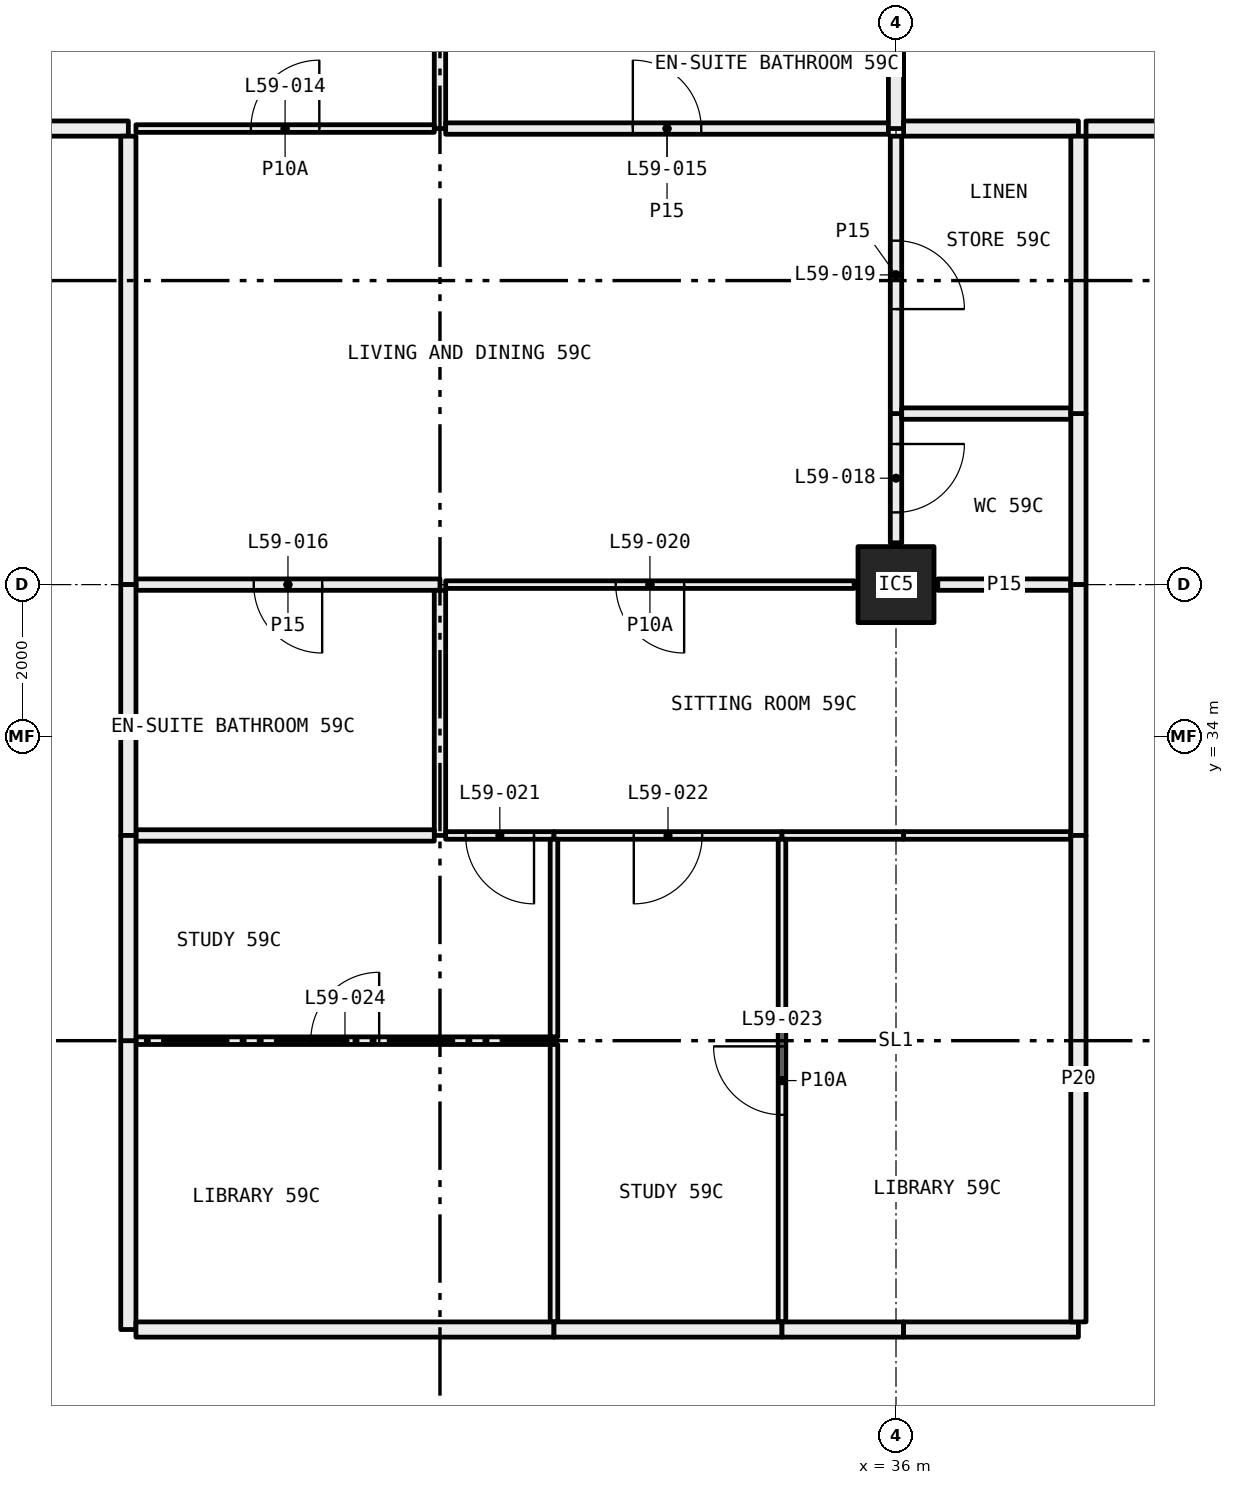
"""IFC4 building model, lengths in metres.
Left out: names, types, materials, properties, quantities, classifications, styles, units other than length and angle.
Written with IfcOpenShell. Run it as: python <this file> out.ifc"""

import sys

from ifc_helpers import new_model, si_unit, direction, frame, frame_2d, origin, origin_2d, place, context, subcontext, project, spatial, rectangle, hollow_rectangle, extrude, element, fill, save


model = new_model("IFC4")
c1 = context("Model", 3, precision=1e-05, world=origin(), true_north=direction((0.0, 1.0)))
c2 = subcontext(c1, "Body", "Model", "MODEL_VIEW")
j1 = project(units=[si_unit("LENGTHUNIT", "METRE"), si_unit("PLANEANGLEUNIT", "RADIAN")], contexts=[c1])
p1 = place(None, origin())
s1 = spatial("IfcSite", under=j1, at=p1, CompositionType="ELEMENT")
p2 = place(p1, origin())
s2 = spatial("IfcBuilding", under=s1, at=p2, CompositionType="ELEMENT")
p3 = place(p2, frame((0.0, 0.0, 221.4)))
s3 = spatial("IfcBuildingStorey", under=s2, at=p3, CompositionType="ELEMENT", Elevation=221.4)
p4 = place(p3, frame((36.0, 36.0, 0.0), z_axis=(0.0, 0.0, 1.0), x_axis=(1.0, 0.0, 0.0)))
e1 = element("IfcColumn", 1, at=p4, inside=s3, PredefinedType="COLUMN", context=c2, shape_type="SweptSolid", body=[
    extrude(hollow_rectangle(XDim=1.0, YDim=1.0, WallThickness=0.04, at=origin_2d()), origin(), (0.0, 0.0, 1.0), 3.05),
])
p5 = place(p3, frame((30.0, 42.0, 0.0), z_axis=(0.0, 0.0, 1.0), x_axis=(0.0, 1.0, 0.0)))
e2 = element("IfcWall", 2, at=p5, inside=s3, PredefinedType="PARTITIONING", context=c2, shape_type="SweptSolid", body=[
    extrude(rectangle(XDim=1.68, YDim=0.15, at=frame_2d((0.84, 0.0))), origin(), (0.0, 0.0, 1.0), 3.05),
])
p6 = place(p3, frame((26.0, 42.0, 0.0), z_axis=(0.0, 0.0, 1.0), x_axis=(1.0, 0.0, 0.0)))
e3 = element("IfcWall", 3, at=p6, inside=s3, PredefinedType="PARTITIONING", context=c2, shape_type="SweptSolid", body=[
    extrude(rectangle(XDim=3.925, YDim=0.1, at=frame_2d((1.962, 0.0))), origin(), (0.0, 0.0, 1.0), 3.05),
])
p7 = place(p6, frame((1.512, 0.0, 0.0)))
e4 = element("IfcOpeningElement", 4, at=p7, cuts=e3, PredefinedType="OPENING", context=c2, shape_type="SweptSolid", body=[
    extrude(rectangle(XDim=0.9, YDim=2.1, at=frame_2d((0.45, 1.05))), frame((0.0, 0.06, 0.0), z_axis=(0.0, -1.0, 0.0), x_axis=(1.0, 0.0, 0.0)), (0.0, 0.0, 1.0), 0.12),
])
p8 = place(p3, frame((24.0, 42.0, 0.0), z_axis=(0.0, 0.0, 1.0), x_axis=(1.0, 0.0, 0.0)))
e5 = element("IfcWall", 5, at=p8, inside=s3, PredefinedType="PARTITIONING", context=c2, shape_type="SweptSolid", body=[
    extrude(rectangle(XDim=1.9, YDim=0.2, at=frame_2d((0.95, 0.0))), origin(), (0.0, 0.0, 1.0), 3.05),
])
p9 = place(p3, frame((30.075, 42.0, 0.0), z_axis=(0.0, 0.0, 1.0), x_axis=(1.0, 0.0, 0.0)))
e6 = element("IfcWall", 6, at=p9, inside=s3, PredefinedType="PARTITIONING", context=c2, shape_type="SweptSolid", body=[
    extrude(rectangle(XDim=5.825, YDim=0.15, at=frame_2d((2.913, 0.0))), origin(), (0.0, 0.0, 1.0), 3.05),
])
p10 = place(p9, frame((2.462, 0.0, 0.0)))
e7 = element("IfcOpeningElement", 7, at=p10, cuts=e6, PredefinedType="OPENING", context=c2, shape_type="SweptSolid", body=[
    extrude(rectangle(XDim=0.9, YDim=2.1, at=frame_2d((0.45, 1.05))), frame((0.0, 0.085, 0.0), z_axis=(0.0, -1.0, 0.0), x_axis=(1.0, 0.0, 0.0)), (0.0, 0.0, 1.0), 0.17),
])
p11 = place(p3, frame((36.0, 42.0, 0.0), z_axis=(0.0, 0.0, 1.0), x_axis=(0.0, 1.0, 0.0)))
e8 = element("IfcWall", 8, at=p11, inside=s3, PredefinedType="PARTITIONING", context=c2, shape_type="SweptSolid", body=[
    extrude(rectangle(XDim=1.68, YDim=0.2, at=frame_2d((0.84, 0.0))), origin(), (0.0, 0.0, 1.0), 2.45),
])
p12 = place(p3, frame((36.0, 36.55, 0.0), z_axis=(0.0, 0.0, 1.0), x_axis=(0.0, 1.0, 0.0)))
e9 = element("IfcWall", 9, at=p12, inside=s3, PredefinedType="PARTITIONING", context=c2, shape_type="SweptSolid", body=[
    extrude(rectangle(XDim=1.7, YDim=0.15, at=frame_2d((0.85, 0.0))), origin(), (0.0, 0.0, 1.0), 2.45),
])
p13 = place(p12, frame((0.4, 0.0, 0.0)))
e10 = element("IfcOpeningElement", 10, at=p13, cuts=e9, PredefinedType="OPENING", context=c2, shape_type="SweptSolid", body=[
    extrude(rectangle(XDim=0.9, YDim=2.1, at=frame_2d((0.45, 1.05))), frame((0.0, 0.085, 0.0), z_axis=(0.0, -1.0, 0.0), x_axis=(1.0, 0.0, 0.0)), (0.0, 0.0, 1.0), 0.17),
])
p14 = place(p3, frame((36.0, 38.25, 0.0), z_axis=(0.0, 0.0, 1.0), x_axis=(0.0, 1.0, 0.0)))
e11 = element("IfcWall", 11, at=p14, inside=s3, PredefinedType="PARTITIONING", context=c2, shape_type="SweptSolid", body=[
    extrude(rectangle(XDim=3.65, YDim=0.15, at=frame_2d((1.825, 0.0))), origin(), (0.0, 0.0, 1.0), 2.45),
])
p15 = place(p14, frame((1.375, 0.0, 0.0)))
e12 = element("IfcOpeningElement", 12, at=p15, cuts=e11, PredefinedType="OPENING", context=c2, shape_type="SweptSolid", body=[
    extrude(rectangle(XDim=0.9, YDim=2.1, at=frame_2d((0.45, 1.05))), frame((0.0, 0.085, 0.0), z_axis=(0.0, -1.0, 0.0), x_axis=(1.0, 0.0, 0.0)), (0.0, 0.0, 1.0), 0.17),
])
p16 = place(p3, frame((26.0, 36.0, 0.0), z_axis=(0.0, 0.0, 1.0), x_axis=(1.0, 0.0, 0.0)))
e13 = element("IfcWall", 13, at=p16, inside=s3, PredefinedType="PARTITIONING", context=c2, shape_type="SweptSolid", body=[
    extrude(rectangle(XDim=4.0, YDim=0.15, at=frame_2d((2.0, 0.0))), origin(), (0.0, 0.0, 1.0), 2.45),
])
p17 = place(p16, frame((1.55, 0.0, 0.0)))
e14 = element("IfcOpeningElement", 14, at=p17, cuts=e13, PredefinedType="OPENING", context=c2, shape_type="SweptSolid", body=[
    extrude(rectangle(XDim=0.9, YDim=2.1, at=frame_2d((0.45, 1.05))), frame((0.0, 0.085, 0.0), z_axis=(0.0, -1.0, 0.0), x_axis=(1.0, 0.0, 0.0)), (0.0, 0.0, 1.0), 0.17),
])
p18 = place(p3, frame((30.075, 36.0, 0.0), z_axis=(0.0, 0.0, 1.0), x_axis=(1.0, 0.0, 0.0)))
e15 = element("IfcWall", 15, at=p18, inside=s3, PredefinedType="PARTITIONING", context=c2, shape_type="SweptSolid", body=[
    extrude(rectangle(XDim=5.375, YDim=0.1, at=frame_2d((2.688, 0.0))), origin(), (0.0, 0.0, 1.0), 2.45),
])
p19 = place(p18, frame((2.238, 0.0, 0.0)))
e16 = element("IfcOpeningElement", 16, at=p19, cuts=e15, PredefinedType="OPENING", context=c2, shape_type="SweptSolid", body=[
    extrude(rectangle(XDim=0.9, YDim=2.1, at=frame_2d((0.45, 1.05))), frame((0.0, 0.06, 0.0), z_axis=(0.0, -1.0, 0.0), x_axis=(1.0, 0.0, 0.0)), (0.0, 0.0, 1.0), 0.12),
])
p20 = place(p3, frame((25.9, 41.9, 0.0), z_axis=(0.0, 0.0, 1.0), x_axis=(0.0, -1.0, 0.0)))
e17 = element("IfcWall", 17, at=p20, inside=s3, PredefinedType="PARTITIONING", context=c2, shape_type="SweptSolid", body=[
    extrude(rectangle(XDim=5.9, YDim=0.2, at=frame_2d((2.95, 0.0))), origin(), (0.0, 0.0, 1.0), 2.45),
])
p21 = place(p3, frame((38.3, 38.25, 0.0), z_axis=(0.0, 0.0, 1.0), x_axis=(-1.0, 0.0, 0.0)))
e18 = element("IfcWall", 18, at=p21, inside=s3, PredefinedType="PARTITIONING", context=c2, shape_type="SweptSolid", body=[
    extrude(rectangle(XDim=2.225, YDim=0.15, at=frame_2d((1.113, 0.0))), origin(), (0.0, 0.0, 1.0), 2.45),
])
p22 = place(p3, frame((36.55, 36.0, 0.0), z_axis=(0.0, 0.0, 1.0), x_axis=(1.0, 0.0, 0.0)))
e19 = element("IfcWall", 19, at=p22, inside=s3, PredefinedType="PARTITIONING", context=c2, shape_type="SweptSolid", body=[
    extrude(rectangle(XDim=1.75, YDim=0.15, at=frame_2d((0.875, 0.0))), origin(), (0.0, 0.0, 1.0), 2.45),
])
p23 = place(p3, frame((38.4, 36.0, 0.0), z_axis=(0.0, 0.0, 1.0), x_axis=(0.0, 1.0, 0.0)))
e20 = element("IfcWall", 20, at=p23, inside=s3, PredefinedType="PARTITIONING", context=c2, shape_type="SweptSolid", body=[
    extrude(rectangle(XDim=2.25, YDim=0.2, at=frame_2d((1.125, 0.0))), origin(), (0.0, 0.0, 1.0), 2.45),
])
p24 = place(p3, frame((38.4, 42.0, 0.0), z_axis=(0.0, 0.0, 1.0), x_axis=(-1.0, 0.0, 0.0)))
e21 = element("IfcWall", 21, at=p24, inside=s3, PredefinedType="PARTITIONING", context=c2, shape_type="SweptSolid", body=[
    extrude(rectangle(XDim=2.3, YDim=0.2, at=frame_2d((1.15, 0.0))), origin(), (0.0, 0.0, 1.0), 3.05),
])
p25 = place(p3, frame((38.4, 38.25, 0.0), z_axis=(0.0, 0.0, 1.0), x_axis=(0.0, 1.0, 0.0)))
e22 = element("IfcWall", 22, at=p25, inside=s3, PredefinedType="PARTITIONING", context=c2, shape_type="SweptSolid", body=[
    extrude(rectangle(XDim=3.65, YDim=0.2, at=frame_2d((1.825, 0.0))), origin(), (0.0, 0.0, 1.0), 3.05),
])
p26 = place(p3, frame((30.0, 32.7, 0.0), z_axis=(0.0, 0.0, 1.0), x_axis=(0.0, 1.0, 0.0)))
e23 = element("IfcWall", 23, at=p26, inside=s3, PredefinedType="PARTITIONING", context=c2, shape_type="SweptSolid", body=[
    extrude(rectangle(XDim=3.225, YDim=0.15, at=frame_2d((1.613, 0.0))), origin(), (0.0, 0.0, 1.0), 2.45),
])
p27 = place(p3, frame((26.0, 32.7, 0.0), z_axis=(0.0, 0.0, 1.0), x_axis=(1.0, 0.0, 0.0)))
e24 = element("IfcWall", 24, at=p27, inside=s3, PredefinedType="PARTITIONING", context=c2, shape_type="SweptSolid", body=[
    extrude(rectangle(XDim=3.925, YDim=0.15, at=frame_2d((1.962, 0.0))), origin(), (0.0, 0.0, 1.0), 3.05),
])
p28 = place(p3, frame((25.9, 36.0, 0.0), z_axis=(0.0, 0.0, 1.0), x_axis=(0.0, -1.0, 0.0)))
e25 = element("IfcWall", 25, at=p28, inside=s3, PredefinedType="PARTITIONING", context=c2, shape_type="SweptSolid", body=[
    extrude(rectangle(XDim=3.3, YDim=0.2, at=frame_2d((1.65, 0.0))), origin(), (0.0, 0.0, 1.0), 2.45),
])
p29 = place(p3, frame((30.075, 32.7, 0.0), z_axis=(0.0, 0.0, 1.0), x_axis=(1.0, 0.0, 0.0)))
e26 = element("IfcWall", 26, at=p29, inside=s3, PredefinedType="PARTITIONING", context=c2, shape_type="SweptSolid", body=[
    extrude(rectangle(XDim=1.425, YDim=0.1, at=frame_2d((0.712, 0.0))), origin(), (0.0, 0.0, 1.0), 3.05),
])
p30 = place(p29, frame((0.262, 0.0, 0.0)))
e27 = element("IfcOpeningElement", 27, at=p30, cuts=e26, PredefinedType="OPENING", context=c2, shape_type="SweptSolid", body=[
    extrude(rectangle(XDim=0.9, YDim=2.1, at=frame_2d((0.45, 1.05))), frame((0.0, 0.06, 0.0), z_axis=(0.0, -1.0, 0.0), x_axis=(1.0, 0.0, 0.0)), (0.0, 0.0, 1.0), 0.12),
])
p31 = place(p3, frame((31.5, 32.7, 0.0), z_axis=(0.0, 0.0, 1.0), x_axis=(1.0, 0.0, 0.0)))
e28 = element("IfcWall", 28, at=p31, inside=s3, PredefinedType="PARTITIONING", context=c2, shape_type="SweptSolid", body=[
    extrude(rectangle(XDim=3.0, YDim=0.1, at=frame_2d((1.5, 0.0))), origin(), (0.0, 0.0, 1.0), 3.05),
])
p32 = place(p31, frame((1.05, 0.0, 0.0)))
e29 = element("IfcOpeningElement", 29, at=p32, cuts=e28, PredefinedType="OPENING", context=c2, shape_type="SweptSolid", body=[
    extrude(rectangle(XDim=0.9, YDim=2.1, at=frame_2d((0.45, 1.05))), frame((0.0, 0.06, 0.0), z_axis=(0.0, -1.0, 0.0), x_axis=(1.0, 0.0, 0.0)), (0.0, 0.0, 1.0), 0.12),
])
p33 = place(p3, frame((34.5, 32.7, 0.0), z_axis=(0.0, 0.0, 1.0), x_axis=(1.0, 0.0, 0.0)))
e30 = element("IfcWall", 30, at=p33, inside=s3, PredefinedType="PARTITIONING", context=c2, shape_type="SweptSolid", body=[
    extrude(rectangle(XDim=1.6, YDim=0.1, at=frame_2d((0.8, 0.0))), origin(), (0.0, 0.0, 1.0), 2.45),
])
p34 = place(p3, frame((36.1, 32.7, 0.0), z_axis=(0.0, 0.0, 1.0), x_axis=(1.0, 0.0, 0.0)))
e31 = element("IfcWall", 31, at=p34, inside=s3, PredefinedType="PARTITIONING", context=c2, shape_type="SweptSolid", body=[
    extrude(rectangle(XDim=2.2, YDim=0.1, at=frame_2d((1.1, 0.0))), origin(), (0.0, 0.0, 1.0), 3.05),
])
p35 = place(p3, frame((38.4, 32.7, 0.0), z_axis=(0.0, 0.0, 1.0), x_axis=(0.0, 1.0, 0.0)))
e32 = element("IfcWall", 32, at=p35, inside=s3, PredefinedType="PARTITIONING", context=c2, shape_type="SweptSolid", body=[
    extrude(rectangle(XDim=3.3, YDim=0.2, at=frame_2d((1.65, 0.0))), origin(), (0.0, 0.0, 1.0), 2.45),
])
p36 = place(p3, frame((31.5, 30.0, 0.0), z_axis=(0.0, 0.0, 1.0), x_axis=(-1.0, 0.0, 0.0)))
e33 = element("IfcWall", 33, at=p36, inside=s3, PredefinedType="PARTITIONING", context=c2, shape_type="SweptSolid", body=[
    extrude(rectangle(XDim=5.5, YDim=0.1, at=frame_2d((2.75, 0.0))), origin(), (0.0, 0.0, 1.0), 3.05),
])
p37 = place(p36, frame((2.3, 0.0, 0.0)))
e34 = element("IfcOpeningElement", 34, at=p37, cuts=e33, PredefinedType="OPENING", context=c2, shape_type="SweptSolid", body=[
    extrude(rectangle(XDim=0.9, YDim=2.1, at=frame_2d((0.45, 1.05))), frame((0.0, 0.06, 0.0), z_axis=(0.0, -1.0, 0.0), x_axis=(1.0, 0.0, 0.0)), (0.0, 0.0, 1.0), 0.12),
])
p38 = place(p3, frame((31.5, 26.3, 0.0), z_axis=(0.0, 0.0, 1.0), x_axis=(0.0, 1.0, 0.0)))
e35 = element("IfcWall", 35, at=p38, inside=s3, PredefinedType="PARTITIONING", context=c2, shape_type="SweptSolid", body=[
    extrude(rectangle(XDim=3.65, YDim=0.1, at=frame_2d((1.825, 0.0))), origin(), (0.0, 0.0, 1.0), 3.05),
])
p39 = place(p3, frame((25.9, 30.0, 0.0), z_axis=(0.0, 0.0, 1.0), x_axis=(0.0, -1.0, 0.0)))
e36 = element("IfcWall", 36, at=p39, inside=s3, PredefinedType="PARTITIONING", context=c2, shape_type="SweptSolid", body=[
    extrude(rectangle(XDim=3.8, YDim=0.2, at=frame_2d((1.9, 0.0))), origin(), (0.0, 0.0, 1.0), 3.05),
])
p40 = place(p3, frame((26.0, 26.2, 0.0), z_axis=(0.0, 0.0, 1.0), x_axis=(1.0, 0.0, 0.0)))
e37 = element("IfcWall", 37, at=p40, inside=s3, PredefinedType="PARTITIONING", context=c2, shape_type="SweptSolid", body=[
    extrude(rectangle(XDim=5.5, YDim=0.2, at=frame_2d((2.75, 0.0))), origin(), (0.0, 0.0, 1.0), 3.05),
])
p41 = place(p3, frame((31.5, 30.05, 0.0), z_axis=(0.0, 0.0, 1.0), x_axis=(0.0, 1.0, 0.0)))
e38 = element("IfcWall", 38, at=p41, inside=s3, PredefinedType="PARTITIONING", context=c2, shape_type="SweptSolid", body=[
    extrude(rectangle(XDim=2.6, YDim=0.1, at=frame_2d((1.3, 0.0))), origin(), (0.0, 0.0, 1.0), 3.05),
])
p42 = place(p3, frame((25.9, 32.7, 0.0), z_axis=(0.0, 0.0, 1.0), x_axis=(0.0, -1.0, 0.0)))
e39 = element("IfcWall", 39, at=p42, inside=s3, PredefinedType="PARTITIONING", context=c2, shape_type="SweptSolid", body=[
    extrude(rectangle(XDim=2.7, YDim=0.2, at=frame_2d((1.35, 0.0))), origin(), (0.0, 0.0, 1.0), 3.05),
])
p43 = place(p3, frame((34.5, 26.3, 0.0), z_axis=(0.0, 0.0, 1.0), x_axis=(0.0, 1.0, 0.0)))
e40 = element("IfcWall", 40, at=p43, inside=s3, PredefinedType="PARTITIONING", context=c2, shape_type="SweptSolid", body=[
    extrude(rectangle(XDim=6.35, YDim=0.1, at=frame_2d((3.175, 0.0))), origin(), (0.0, 0.0, 1.0), 3.05),
])
p44 = place(p43, frame((2.725, 0.0, 0.0)))
e41 = element("IfcOpeningElement", 41, at=p44, cuts=e40, PredefinedType="OPENING", context=c2, shape_type="SweptSolid", body=[
    extrude(rectangle(XDim=0.9, YDim=2.1, at=frame_2d((0.45, 1.05))), frame((0.0, 0.06, 0.0), z_axis=(0.0, -1.0, 0.0), x_axis=(1.0, 0.0, 0.0)), (0.0, 0.0, 1.0), 0.12),
])
p45 = place(p3, frame((31.5, 26.2, 0.0), z_axis=(0.0, 0.0, 1.0), x_axis=(1.0, 0.0, 0.0)))
e42 = element("IfcWall", 42, at=p45, inside=s3, PredefinedType="PARTITIONING", context=c2, shape_type="SweptSolid", body=[
    extrude(rectangle(XDim=3.0, YDim=0.2, at=frame_2d((1.5, 0.0))), origin(), (0.0, 0.0, 1.0), 3.05),
])
p46 = place(p3, frame((34.5, 26.2, 0.0), z_axis=(0.0, 0.0, 1.0), x_axis=(1.0, 0.0, 0.0)))
e43 = element("IfcWall", 43, at=p46, inside=s3, PredefinedType="PARTITIONING", context=c2, shape_type="SweptSolid", body=[
    extrude(rectangle(XDim=1.6, YDim=0.2, at=frame_2d((0.8, 0.0))), origin(), (0.0, 0.0, 1.0), 2.45),
])
p47 = place(p3, frame((36.1, 26.2, 0.0), z_axis=(0.0, 0.0, 1.0), x_axis=(1.0, 0.0, 0.0)))
e44 = element("IfcWall", 44, at=p47, inside=s3, PredefinedType="PARTITIONING", context=c2, shape_type="SweptSolid", body=[
    extrude(rectangle(XDim=2.3, YDim=0.2, at=frame_2d((1.15, 0.0))), origin(), (0.0, 0.0, 1.0), 3.05),
])
p48 = place(p3, frame((38.4, 26.3, 0.0), z_axis=(0.0, 0.0, 1.0), x_axis=(0.0, 1.0, 0.0)))
e45 = element("IfcWall", 45, at=p48, inside=s3, PredefinedType="PARTITIONING", context=c2, shape_type="SweptSolid", body=[
    extrude(rectangle(XDim=6.4, YDim=0.2, at=frame_2d((3.2, 0.0))), origin(), (0.0, 0.0, 1.0), 3.05),
])
p49 = place(p3, frame((38.5, 42.0, 0.0), z_axis=(0.0, 0.0, 1.0), x_axis=(1.0, 0.0, 0.0)))
e46 = element("IfcWall", 46, at=p49, inside=s3, PredefinedType="PARTITIONING", context=c2, shape_type="SweptSolid", body=[
    extrude(rectangle(XDim=2.3, YDim=0.2, at=frame_2d((1.15, 0.0))), origin(), (0.0, 0.0, 1.0), 3.05),
])
p50 = place(p7, origin())
e47 = element("IfcDoor", 47, at=p50, inside=s3, OperationType="SINGLE_SWING_LEFT", PredefinedType="DOOR", context=c2, shape_type="SweptSolid", body=[
    extrude(rectangle(XDim=0.9, YDim=2.1, at=frame_2d((0.45, 1.05))), frame((0.0, 0.025, 0.0), z_axis=(0.0, -1.0, 0.0), x_axis=(1.0, 0.0, 0.0)), (0.0, 0.0, 1.0), 0.05),
])
fill(e4, e47)
p51 = place(p10, origin())
e48 = element("IfcDoor", 48, at=p51, inside=s3, OperationType="SINGLE_SWING_RIGHT", PredefinedType="DOOR", context=c2, shape_type="SweptSolid", body=[
    extrude(rectangle(XDim=0.9, YDim=2.1, at=frame_2d((0.45, 1.05))), frame((0.0, 0.025, 0.0), z_axis=(0.0, -1.0, 0.0), x_axis=(1.0, 0.0, 0.0)), (0.0, 0.0, 1.0), 0.05),
])
fill(e7, e48)
p52 = place(p17, frame((0.9, 0.0, 0.0), x_axis=(-1.0, 0.0, 0.0)))
e49 = element("IfcDoor", 49, at=p52, inside=s3, OperationType="SINGLE_SWING_RIGHT", PredefinedType="DOOR", context=c2, shape_type="SweptSolid", body=[
    extrude(rectangle(XDim=0.9, YDim=2.1, at=frame_2d((0.45, 1.05))), frame((0.0, 0.025, 0.0), z_axis=(0.0, -1.0, 0.0), x_axis=(1.0, 0.0, 0.0)), (0.0, 0.0, 1.0), 0.05),
])
fill(e14, e49)
p53 = place(p13, frame((0.9, 0.0, 0.0), x_axis=(-1.0, 0.0, 0.0)))
e50 = element("IfcDoor", 50, at=p53, inside=s3, OperationType="SINGLE_SWING_RIGHT", PredefinedType="DOOR", context=c2, shape_type="SweptSolid", body=[
    extrude(rectangle(XDim=0.9, YDim=2.1, at=frame_2d((0.45, 1.05))), frame((0.0, 0.025, 0.0), z_axis=(0.0, -1.0, 0.0), x_axis=(1.0, 0.0, 0.0)), (0.0, 0.0, 1.0), 0.05),
])
fill(e10, e50)
p54 = place(p15, frame((0.9, 0.0, 0.0), x_axis=(-1.0, 0.0, 0.0)))
e51 = element("IfcDoor", 51, at=p54, inside=s3, OperationType="SINGLE_SWING_LEFT", PredefinedType="DOOR", context=c2, shape_type="SweptSolid", body=[
    extrude(rectangle(XDim=0.9, YDim=2.1, at=frame_2d((0.45, 1.05))), frame((0.0, 0.025, 0.0), z_axis=(0.0, -1.0, 0.0), x_axis=(1.0, 0.0, 0.0)), (0.0, 0.0, 1.0), 0.05),
])
fill(e12, e51)
p55 = place(p19, frame((0.9, 0.0, 0.0), x_axis=(-1.0, 0.0, 0.0)))
e52 = element("IfcDoor", 52, at=p55, inside=s3, OperationType="SINGLE_SWING_RIGHT", PredefinedType="DOOR", context=c2, shape_type="SweptSolid", body=[
    extrude(rectangle(XDim=0.9, YDim=2.1, at=frame_2d((0.45, 1.05))), frame((0.0, 0.025, 0.0), z_axis=(0.0, -1.0, 0.0), x_axis=(1.0, 0.0, 0.0)), (0.0, 0.0, 1.0), 0.05),
])
fill(e16, e52)
p56 = place(p30, frame((0.9, 0.0, 0.0), x_axis=(-1.0, 0.0, 0.0)))
e53 = element("IfcDoor", 53, at=p56, inside=s3, OperationType="SINGLE_SWING_RIGHT", PredefinedType="DOOR", context=c2, shape_type="SweptSolid", body=[
    extrude(rectangle(XDim=0.9, YDim=2.1, at=frame_2d((0.45, 1.05))), frame((0.0, 0.025, 0.0), z_axis=(0.0, -1.0, 0.0), x_axis=(1.0, 0.0, 0.0)), (0.0, 0.0, 1.0), 0.05),
])
fill(e27, e53)
p57 = place(p32, frame((0.9, 0.0, 0.0), x_axis=(-1.0, 0.0, 0.0)))
e54 = element("IfcDoor", 54, at=p57, inside=s3, OperationType="SINGLE_SWING_LEFT", PredefinedType="DOOR", context=c2, shape_type="SweptSolid", body=[
    extrude(rectangle(XDim=0.9, YDim=2.1, at=frame_2d((0.45, 1.05))), frame((0.0, 0.025, 0.0), z_axis=(0.0, -1.0, 0.0), x_axis=(1.0, 0.0, 0.0)), (0.0, 0.0, 1.0), 0.05),
])
fill(e29, e54)
p58 = place(p44, origin())
e55 = element("IfcDoor", 55, at=p58, inside=s3, OperationType="SINGLE_SWING_LEFT", PredefinedType="DOOR", context=c2, shape_type="SweptSolid", body=[
    extrude(rectangle(XDim=0.9, YDim=2.1, at=frame_2d((0.45, 1.05))), frame((0.0, 0.025, 0.0), z_axis=(0.0, -1.0, 0.0), x_axis=(1.0, 0.0, 0.0)), (0.0, 0.0, 1.0), 0.05),
])
fill(e41, e55)
p59 = place(p37, frame((0.9, 0.0, 0.0), x_axis=(-1.0, 0.0, 0.0)))
e56 = element("IfcDoor", 56, at=p59, inside=s3, OperationType="SINGLE_SWING_LEFT", PredefinedType="DOOR", context=c2, shape_type="SweptSolid", body=[
    extrude(rectangle(XDim=0.9, YDim=2.1, at=frame_2d((0.45, 1.05))), frame((0.0, 0.025, 0.0), z_axis=(0.0, -1.0, 0.0), x_axis=(1.0, 0.0, 0.0)), (0.0, 0.0, 1.0), 0.05),
])
fill(e34, e56)
save(model, sys.argv[1])
